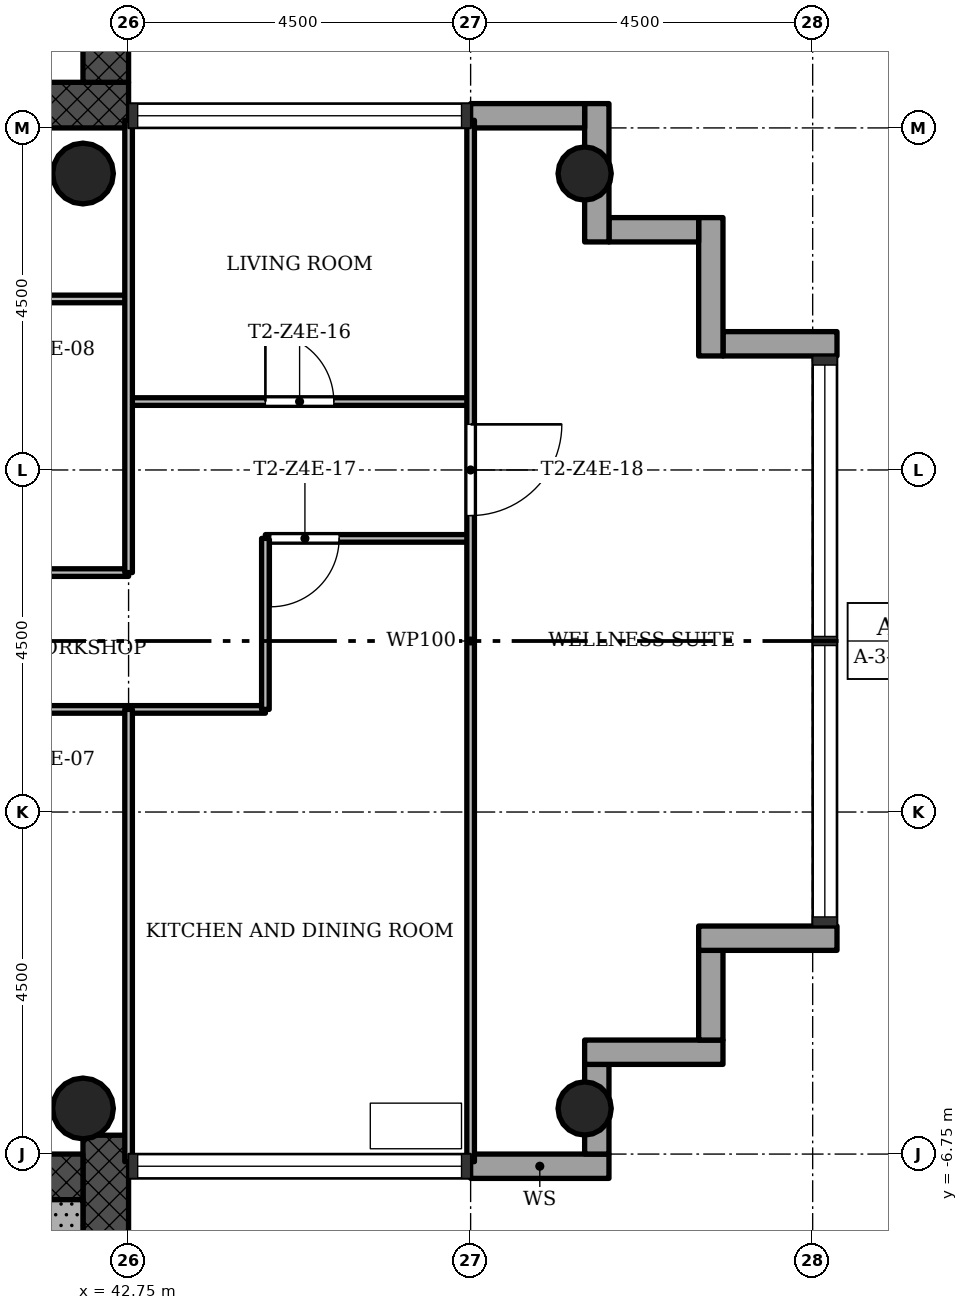
"""IFC4 building model, lengths in metres.
Left out: names, types, materials, properties, quantities, classifications, styles, units other than length and angle.
Written with IfcOpenShell. Run it as: python <this file> out.ifc"""

import sys

from ifc_helpers import new_model, si_unit, direction, frame, frame_2d, origin, origin_2d, place, context, subcontext, project, spatial, rectangle, hollow_circle, extrude, element, fill, save


model = new_model("IFC4")
c1 = context("Model", 3, precision=1e-05, world=origin(), true_north=direction((0.0, 1.0)))
c2 = subcontext(c1, "Body", "Model", "MODEL_VIEW")
j1 = project(units=[si_unit("LENGTHUNIT", "METRE"), si_unit("PLANEANGLEUNIT", "RADIAN")], contexts=[c1])
p1 = place(None, origin())
s1 = spatial("IfcSite", under=j1, at=p1, CompositionType="ELEMENT")
p2 = place(p1, origin())
s2 = spatial("IfcBuilding", under=s1, at=p2, CompositionType="ELEMENT")
p3 = place(p2, frame((0.0, 0.0, 206.2)))
s3 = spatial("IfcBuildingStorey", under=s2, at=p3, CompositionType="ELEMENT", Elevation=206.2)
p4 = place(p3, frame((29.85, 7.05, 0.0), z_axis=(0.0, 0.0, 1.0), x_axis=(1.0, 0.0, 0.0)))
e1 = element("IfcWall", 1, at=p4, inside=s3, PredefinedType="SHEAR", context=c2, shape_type="SweptSolid", body=[
    extrude(rectangle(XDim=12.9, YDim=0.6, at=frame_2d((6.45, 0.0))), origin(), (0.0, 0.0, 1.0), 3.4),
])
p5 = place(p4, frame((5.25, 0.0, 0.0)))
e2 = element("IfcOpeningElement", 2, at=p5, cuts=e1, PredefinedType="OPENING", context=c2, shape_type="SweptSolid", body=[
    extrude(rectangle(XDim=1.8, YDim=2.1, at=frame_2d((0.9, 1.05))), frame((0.0, 0.31, 0.0), z_axis=(0.0, -1.0, 0.0), x_axis=(1.0, 0.0, 0.0)), (0.0, 0.0, 1.0), 0.62),
])
p6 = place(p3, frame((42.45, 7.35, 0.0), z_axis=(0.0, 0.0, 1.0), x_axis=(0.0, 1.0, 0.0)))
e3 = element("IfcWall", 3, at=p6, inside=s3, PredefinedType="SHEAR", context=c2, shape_type="SweptSolid", body=[
    extrude(rectangle(XDim=8.4, YDim=0.6, at=frame_2d((4.2, 0.0))), origin(), (0.0, 0.0, 1.0), 3.4),
])
p7 = place(p3, frame((42.45, -15.15, 0.0), z_axis=(0.0, 0.0, 1.0), x_axis=(0.0, 1.0, 0.0)))
e4 = element("IfcWall", 4, at=p7, inside=s3, PredefinedType="SHEAR", context=c2, shape_type="SweptSolid", body=[
    extrude(rectangle(XDim=8.648, YDim=0.6, at=frame_2d((4.324, 0.0))), origin(), (0.0, 0.0, 1.0), 3.4),
])
p8 = place(p3, frame((42.15, -7.05, 0.0), z_axis=(0.0, 0.0, 1.0), x_axis=(-1.0, 0.0, 0.0)))
e5 = element("IfcWall", 5, at=p8, inside=s3, PredefinedType="SHEAR", context=c2, shape_type="SweptSolid", body=[
    extrude(rectangle(XDim=12.9, YDim=0.6, at=frame_2d((6.45, 0.0))), origin(), (0.0, 0.0, 1.0), 3.4),
])
p9 = place(p8, frame((5.25, 0.0, 0.0)))
e6 = element("IfcOpeningElement", 6, at=p9, cuts=e5, PredefinedType="OPENING", context=c2, shape_type="SweptSolid", body=[
    extrude(rectangle(XDim=1.8, YDim=2.1, at=frame_2d((0.9, 1.05))), frame((0.0, 0.31, 0.0), z_axis=(0.0, -1.0, 0.0), x_axis=(1.0, 0.0, 0.0)), (0.0, 0.0, 1.0), 0.62),
])
for number, where, z_axis, x_axis in (
    (7, (48.75, -6.15, 0.0), (0.0, 0.0, 1.0), (1.0, 0.0, 0.0)),
    (8, (48.75, 6.15, 0.0), (0.0, 0.0, 1.0), (1.0, 0.0, 0.0)),
):
    element("IfcColumn", number, at=place(p3, frame(where, z_axis=z_axis, x_axis=x_axis)), inside=s3, PredefinedType="COLUMN", context=c2, shape_type="SweptSolid", body=[
        extrude(hollow_circle(Radius=0.35, WallThickness=0.025, at=origin_2d()), origin(), (0.0, 0.0, 1.0), 3.4),
    ])
for number, where, z_axis, x_axis in (
    (9, (42.15, -6.15, 0.0), (0.0, 0.0, 1.0), (1.0, 0.0, 0.0)),
    (10, (42.15, 6.15, 0.0), (0.0, 0.0, 1.0), (1.0, 0.0, 0.0)),
):
    element("IfcColumn", number, at=place(p3, frame(where, z_axis=z_axis, x_axis=x_axis)), inside=s3, PredefinedType="COLUMN", context=c2, shape_type="SweptSolid", body=[
        extrude(hollow_circle(Radius=0.4, WallThickness=0.028, at=origin_2d()), origin(), (0.0, 0.0, 1.0), 3.4),
    ])
p10 = place(p3, frame((47.25, -6.91, -0.3), z_axis=(0.0, 0.0, 1.0), x_axis=(1.0, 0.0, 0.0)))
e11 = element("IfcWall", 11, at=p10, inside=s3, PredefinedType="STANDARD", context=c2, shape_type="SweptSolid", body=[
    extrude(rectangle(XDim=1.82, YDim=0.32, at=frame_2d((0.91, 0.0))), origin(), (0.0, 0.0, 1.0), 3.4),
])
p11 = place(p3, frame((48.91, -6.75, -0.3), z_axis=(0.0, 0.0, 1.0), x_axis=(0.0, 1.0, 0.0)))
e12 = element("IfcWall", 12, at=p11, inside=s3, PredefinedType="STANDARD", context=c2, shape_type="SweptSolid", body=[
    extrude(rectangle(XDim=1.18, YDim=0.32, at=frame_2d((0.59, 0.0))), origin(), (0.0, 0.0, 1.0), 3.4),
])
p12 = place(p3, frame((48.75, -5.41, -0.3), z_axis=(0.0, 0.0, 1.0), x_axis=(1.0, 0.0, 0.0)))
e13 = element("IfcWall", 13, at=p12, inside=s3, PredefinedType="STANDARD", context=c2, shape_type="SweptSolid", body=[
    extrude(rectangle(XDim=1.82, YDim=0.32, at=frame_2d((0.91, 0.0))), origin(), (0.0, 0.0, 1.0), 3.4),
])
p13 = place(p3, frame((50.41, -5.25, -0.3), z_axis=(0.0, 0.0, 1.0), x_axis=(0.0, 1.0, 0.0)))
e14 = element("IfcWall", 14, at=p13, inside=s3, PredefinedType="STANDARD", context=c2, shape_type="SweptSolid", body=[
    extrude(rectangle(XDim=1.18, YDim=0.32, at=frame_2d((0.59, 0.0))), origin(), (0.0, 0.0, 1.0), 3.4),
])
p14 = place(p3, frame((50.25, -3.91, -0.3), z_axis=(0.0, 0.0, 1.0), x_axis=(1.0, 0.0, 0.0)))
e15 = element("IfcWall", 15, at=p14, inside=s3, PredefinedType="STANDARD", context=c2, shape_type="SweptSolid", body=[
    extrude(rectangle(XDim=1.82, YDim=0.32, at=frame_2d((0.91, 0.0))), origin(), (0.0, 0.0, 1.0), 3.4),
])
p15 = place(p3, frame((52.07, 3.91, -0.3), z_axis=(0.0, 0.0, 1.0), x_axis=(-1.0, 0.0, 0.0)))
e16 = element("IfcWall", 16, at=p15, inside=s3, PredefinedType="STANDARD", context=c2, shape_type="SweptSolid", body=[
    extrude(rectangle(XDim=1.5, YDim=0.32, at=frame_2d((0.75, 0.0))), origin(), (0.0, 0.0, 1.0), 3.4),
])
p16 = place(p3, frame((50.41, 3.75, -0.3), z_axis=(0.0, 0.0, 1.0), x_axis=(0.0, 1.0, 0.0)))
e17 = element("IfcWall", 17, at=p16, inside=s3, PredefinedType="STANDARD", context=c2, shape_type="SweptSolid", body=[
    extrude(rectangle(XDim=1.82, YDim=0.32, at=frame_2d((0.91, 0.0))), origin(), (0.0, 0.0, 1.0), 3.4),
])
p17 = place(p3, frame((50.25, 5.41, -0.3), z_axis=(0.0, 0.0, 1.0), x_axis=(-1.0, 0.0, 0.0)))
e18 = element("IfcWall", 18, at=p17, inside=s3, PredefinedType="STANDARD", context=c2, shape_type="SweptSolid", body=[
    extrude(rectangle(XDim=1.18, YDim=0.32, at=frame_2d((0.59, 0.0))), origin(), (0.0, 0.0, 1.0), 3.4),
])
p18 = place(p3, frame((48.91, 5.25, -0.3), z_axis=(0.0, 0.0, 1.0), x_axis=(0.0, 1.0, 0.0)))
e19 = element("IfcWall", 19, at=p18, inside=s3, PredefinedType="STANDARD", context=c2, shape_type="SweptSolid", body=[
    extrude(rectangle(XDim=1.82, YDim=0.32, at=frame_2d((0.91, 0.0))), origin(), (0.0, 0.0, 1.0), 3.4),
])
p19 = place(p3, frame((48.75, 6.91, -0.3), z_axis=(0.0, 0.0, 1.0), x_axis=(-1.0, 0.0, 0.0)))
e20 = element("IfcWall", 20, at=p19, inside=s3, PredefinedType="STANDARD", context=c2, shape_type="SweptSolid", body=[
    extrude(rectangle(XDim=1.5, YDim=0.32, at=frame_2d((0.75, 0.0))), origin(), (0.0, 0.0, 1.0), 3.4),
])
p20 = place(p3, frame((44.55, -0.9, 0.0), z_axis=(0.0, 0.0, 1.0), x_axis=(-1.0, 0.0, 0.0)))
e21 = element("IfcWall", 21, at=p20, inside=s3, PredefinedType="PARTITIONING", context=c2, shape_type="SweptSolid", body=[
    extrude(rectangle(XDim=4.05, YDim=0.1, at=frame_2d((2.025, 0.0))), origin(), (0.0, 0.0, 1.0), 3.0),
])
p21 = place(p3, frame((42.75, 0.9, 0.0), z_axis=(0.0, 0.0, 1.0), x_axis=(-1.0, 0.0, 0.0)))
e22 = element("IfcWall", 22, at=p21, inside=s3, PredefinedType="PARTITIONING", context=c2, shape_type="SweptSolid", body=[
    extrude(rectangle(XDim=2.25, YDim=0.1, at=frame_2d((1.125, 0.0))), origin(), (0.0, 0.0, 1.0), 3.0),
])
p22 = place(p3, frame((47.25, 1.35, 0.0), z_axis=(0.0, 0.0, 1.0), x_axis=(-1.0, 0.0, 0.0)))
e23 = element("IfcWall", 23, at=p22, inside=s3, PredefinedType="PARTITIONING", context=c2, shape_type="SweptSolid", body=[
    extrude(rectangle(XDim=2.7, YDim=0.1, at=frame_2d((1.35, 0.0))), origin(), (0.0, 0.0, 1.0), 3.0),
])
p23 = place(p22, frame((1.73, 0.0, 0.0)))
e24 = element("IfcOpeningElement", 24, at=p23, cuts=e23, PredefinedType="OPENING", context=c2, shape_type="SweptSolid", body=[
    extrude(rectangle(XDim=0.9, YDim=2.1, at=frame_2d((0.45, 1.05))), frame((0.0, 0.06, 0.0), z_axis=(0.0, -1.0, 0.0), x_axis=(1.0, 0.0, 0.0)), (0.0, 0.0, 1.0), 0.12),
])
p24 = place(p3, frame((47.25, 3.15, 0.0), z_axis=(0.0, 0.0, 1.0), x_axis=(-1.0, 0.0, 0.0)))
e25 = element("IfcWall", 25, at=p24, inside=s3, PredefinedType="PARTITIONING", context=c2, shape_type="SweptSolid", body=[
    extrude(rectangle(XDim=4.5, YDim=0.1, at=frame_2d((2.25, 0.0))), origin(), (0.0, 0.0, 1.0), 3.0),
])
p25 = place(p24, frame((1.8, 0.0, 0.0)))
e26 = element("IfcOpeningElement", 26, at=p25, cuts=e25, PredefinedType="OPENING", context=c2, shape_type="SweptSolid", body=[
    extrude(rectangle(XDim=0.9, YDim=2.1, at=frame_2d((0.45, 1.05))), frame((0.0, 0.06, 0.0), z_axis=(0.0, -1.0, 0.0), x_axis=(1.0, 0.0, 0.0)), (0.0, 0.0, 1.0), 0.12),
])
p26 = place(p3, frame((42.75, 4.5, 0.0), z_axis=(0.0, 0.0, 1.0), x_axis=(-1.0, 0.0, 0.0)))
e27 = element("IfcWall", 27, at=p26, inside=s3, PredefinedType="PARTITIONING", context=c2, shape_type="SweptSolid", body=[
    extrude(rectangle(XDim=5.25, YDim=0.1, at=frame_2d((2.625, 0.0))), origin(), (0.0, 0.0, 1.0), 3.0),
])
p27 = place(p26, frame((3.3, 0.0, 0.0)))
e28 = element("IfcOpeningElement", 28, at=p27, cuts=e27, PredefinedType="OPENING", context=c2, shape_type="SweptSolid", body=[
    extrude(rectangle(XDim=0.9, YDim=2.1, at=frame_2d((0.45, 1.05))), frame((0.0, 0.06, 0.0), z_axis=(0.0, -1.0, 0.0), x_axis=(1.0, 0.0, 0.0)), (0.0, 0.0, 1.0), 0.12),
])
p28 = place(p3, frame((47.25, -6.85, 0.0), z_axis=(0.0, 0.0, 1.0), x_axis=(0.0, 1.0, 0.0)))
e29 = element("IfcWall", 29, at=p28, inside=s3, PredefinedType="PARTITIONING", context=c2, shape_type="SweptSolid", body=[
    extrude(rectangle(XDim=13.7, YDim=0.1, at=frame_2d((6.85, 0.0))), origin(), (0.0, 0.0, 1.0), 3.0),
])
p29 = place(p28, frame((8.5, 0.0, 0.0)))
e30 = element("IfcOpeningElement", 30, at=p29, cuts=e29, PredefinedType="OPENING", context=c2, shape_type="SweptSolid", body=[
    extrude(rectangle(XDim=1.2, YDim=2.1, at=frame_2d((0.6, 1.05))), frame((0.0, 0.06, 0.0), z_axis=(0.0, -1.0, 0.0), x_axis=(1.0, 0.0, 0.0)), (0.0, 0.0, 1.0), 0.12),
])
p30 = place(p3, frame((44.55, -0.9, 0.0), z_axis=(0.0, 0.0, 1.0), x_axis=(0.0, 1.0, 0.0)))
e31 = element("IfcWall", 31, at=p30, inside=s3, PredefinedType="PARTITIONING", context=c2, shape_type="SweptSolid", body=[
    extrude(rectangle(XDim=2.25, YDim=0.1, at=frame_2d((1.125, 0.0))), origin(), (0.0, 0.0, 1.0), 3.0),
])
for number, where, z_axis, x_axis in (
    (32, (42.75, -6.85, 0.0), (0.0, 0.0, 1.0), (0.0, 1.0, 0.0)),
    (33, (42.75, 0.9, 0.0), (0.0, 0.0, 1.0), (0.0, 1.0, 0.0)),
):
    element("IfcWall", number, at=place(p3, frame(where, z_axis=z_axis, x_axis=x_axis)), inside=s3, PredefinedType="PARTITIONING", context=c2, shape_type="SweptSolid", body=[
        extrude(rectangle(XDim=5.95, YDim=0.1, at=frame_2d((2.975, 0.0))), origin(), (0.0, 0.0, 1.0), 3.0),
    ])
p31 = place(p3, frame((37.85, -7.65, 0.0), z_axis=(0.0, 0.0, 1.0), x_axis=(1.0, 0.0, 0.0)))
e34 = element("IfcWall", 34, at=p31, inside=s3, PredefinedType="SHEAR", context=c2, shape_type="SweptSolid", body=[
    extrude(rectangle(XDim=4.3, YDim=0.6, at=frame_2d((2.15, 0.0))), origin(), (0.0, 0.0, 1.0), 3.4),
])
p32 = place(p25, origin())
e35 = element("IfcDoor", 35, at=p32, inside=s3, OperationType="SINGLE_SWING_RIGHT", PredefinedType="DOOR", context=c2, shape_type="SweptSolid", body=[
    extrude(rectangle(XDim=0.9, YDim=2.1, at=frame_2d((0.45, 1.05))), frame((0.0, 0.025, 0.0), z_axis=(0.0, -1.0, 0.0), x_axis=(1.0, 0.0, 0.0)), (0.0, 0.0, 1.0), 0.05),
])
fill(e26, e35)
p33 = place(p23, origin())
e36 = element("IfcDoor", 36, at=p33, inside=s3, OperationType="SINGLE_SWING_LEFT", PredefinedType="DOOR", context=c2, shape_type="SweptSolid", body=[
    extrude(rectangle(XDim=0.9, YDim=2.1, at=frame_2d((0.45, 1.05))), frame((0.0, 0.025, 0.0), z_axis=(0.0, -1.0, 0.0), x_axis=(1.0, 0.0, 0.0)), (0.0, 0.0, 1.0), 0.05),
])
fill(e24, e36)
p34 = place(p29, origin())
e37 = element("IfcDoor", 37, at=p34, inside=s3, OperationType="SINGLE_SWING_RIGHT", PredefinedType="DOOR", context=c2, shape_type="SweptSolid", body=[
    extrude(rectangle(XDim=1.2, YDim=2.1, at=frame_2d((0.6, 1.05))), frame((0.0, 0.025, 0.0), z_axis=(0.0, -1.0, 0.0), x_axis=(1.0, 0.0, 0.0)), (0.0, 0.0, 1.0), 0.05),
])
fill(e30, e37)
save(model, sys.argv[1])
